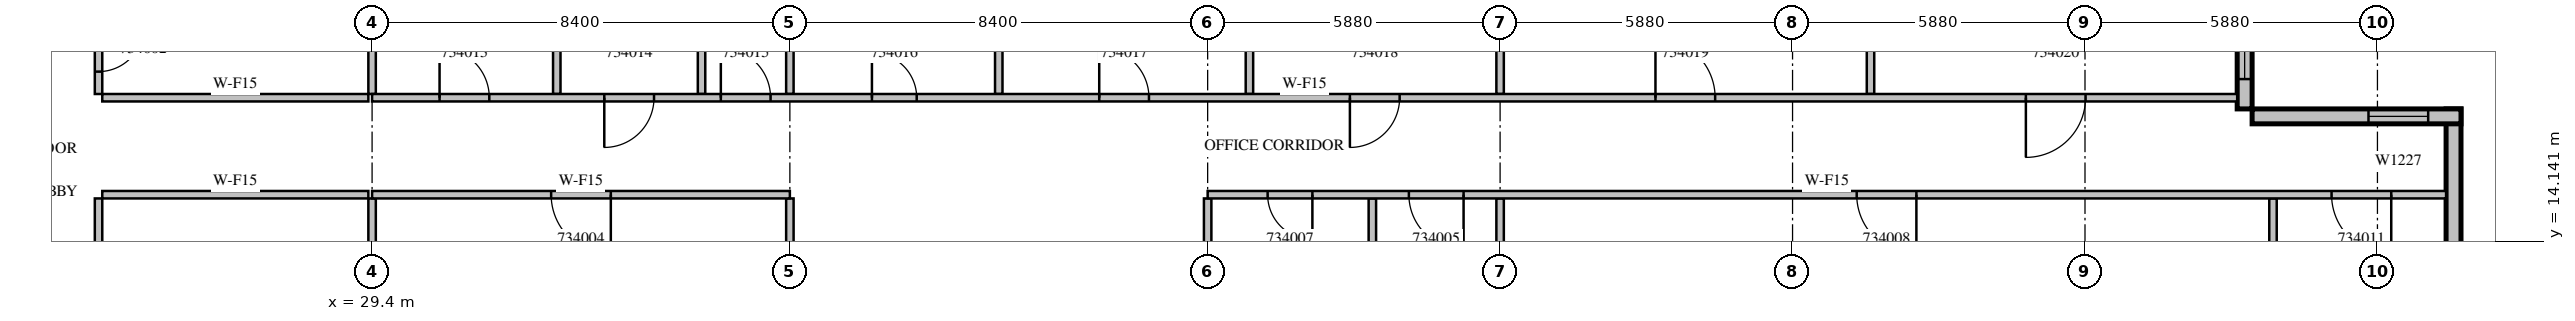
"""IFC4 building model, lengths in metres.
Left out: names, types, materials, properties, quantities, classifications, styles, units other than length and angle.
Written with IfcOpenShell. Run it as: python <this file> out.ifc"""

import sys

from ifc_helpers import new_model, si_unit, direction, frame, frame_2d, origin, place, context, subcontext, project, spatial, rectangle, extrude, source, transform, mapped, element, fill, save


model = new_model("IFC4")
c1 = context("Model", 3, precision=1e-05, world=origin(), true_north=direction((0.0, 1.0)))
c2 = subcontext(c1, "Body", "Model", "MODEL_VIEW")
j1 = project(units=[si_unit("LENGTHUNIT", "METRE"), si_unit("PLANEANGLEUNIT", "RADIAN")], contexts=[c1])
p1 = place(None, origin())
s1 = spatial("IfcSite", under=j1, at=p1, CompositionType="ELEMENT")
p2 = place(p1, origin())
s2 = spatial("IfcBuilding", under=s1, at=p2, CompositionType="ELEMENT")
p3 = place(p2, frame((0.0, 0.0, 153.9)))
s3 = spatial("IfcBuildingStorey", under=s2, at=p3, CompositionType="ELEMENT", Elevation=153.9)
m1 = source(origin(), c2, "Body", "SweptSolid", [
    extrude(rectangle(XDim=6.3, YDim=0.3, at=frame_2d((3.15, 0.0))), origin(), (0.0, 0.0, 1.0), 3.8),
])
p4 = place(p3, frame((71.25, 10.5, 0.0), z_axis=(0.0, 0.0, 1.0), x_axis=(0.0, 1.0, 0.0)))
e1 = element("IfcWall", 1, at=p4, inside=s3, PredefinedType="STANDARD", context=c2, shape_type="MappedRepresentation", body=[
    mapped(m1, transform((0.0, 0.0, 0.0), scale=1.0)),
])
m2 = source(origin(), c2, "Body", "SweptSolid", [
    extrude(rectangle(XDim=1.2, YDim=2.7, at=frame_2d((0.6, 1.35))), frame((0.0, 0.16, 0.0), z_axis=(0.0, -1.0, 0.0), x_axis=(1.0, 0.0, 0.0)), (0.0, 0.0, 1.0), 0.32),
])
p5 = place(p4, frame((1.025, 0.0, 0.6)))
e2 = element("IfcOpeningElement", 2, at=p5, cuts=e1, PredefinedType="OPENING", context=c2, shape_type="MappedRepresentation", body=[
    mapped(m2, transform((0.0, 0.0, 0.0), scale=1.0)),
])
m3 = source(origin(), c2, "Body", "SweptSolid", [
    extrude(rectangle(XDim=4.2, YDim=0.3, at=frame_2d((2.1, 0.0))), origin(), (0.0, 0.0, 1.0), 3.8),
])
p6 = place(p3, frame((71.4, 16.65, 0.0), z_axis=(0.0, 0.0, 1.0), x_axis=(-1.0, 0.0, 0.0)))
e3 = element("IfcWall", 3, at=p6, inside=s3, PredefinedType="STANDARD", context=c2, shape_type="MappedRepresentation", body=[
    mapped(m3, transform((0.0, 0.0, 0.0), scale=1.0)),
])
p7 = place(p6, frame((0.66, 0.0, 0.6)))
e4 = element("IfcOpeningElement", 4, at=p7, cuts=e3, PredefinedType="OPENING", context=c2, shape_type="MappedRepresentation", body=[
    mapped(m2, transform((0.0, 0.0, 0.0), scale=1.0)),
])
p8 = place(p3, frame((67.05, 16.8, 0.0), z_axis=(0.0, 0.0, 1.0), x_axis=(0.0, 1.0, 0.0)))
e5 = element("IfcWall", 5, at=p8, inside=s3, PredefinedType="STANDARD", context=c2, shape_type="MappedRepresentation", body=[
    mapped(m3, transform((0.0, 0.0, 0.0), scale=1.0)),
])
m4 = source(origin(), c2, "Body", "SweptSolid", [
    extrude(rectangle(XDim=3.0, YDim=2.7, at=frame_2d((1.5, 1.35))), frame((0.0, 0.16, 0.0), z_axis=(0.0, -1.0, 0.0), x_axis=(1.0, 0.0, 0.0)), (0.0, 0.0, 1.0), 0.32),
])
p9 = place(p8, frame((0.6, 0.0, 0.6)))
e6 = element("IfcOpeningElement", 6, at=p9, cuts=e5, PredefinedType="OPENING", context=c2, shape_type="MappedRepresentation", body=[
    mapped(m4, transform((0.0, 0.0, 0.0), scale=1.0)),
])
m5 = source(origin(), c2, "Body", "SweptSolid", [
    extrude(rectangle(XDim=4.295, YDim=0.15, at=frame_2d((2.147, 0.0))), origin(), (0.0, 0.0, 1.0), 3.8),
])
p10 = place(p3, frame((23.9, 15.0, 0.0), z_axis=(0.0, 0.0, 1.0), x_axis=(0.0, -1.0, 0.0)))
e7 = element("IfcWall", 7, at=p10, inside=s3, PredefinedType="PARTITIONING", context=c2, shape_type="MappedRepresentation", body=[
    mapped(m5, transform((0.0, 0.0, 0.0), scale=1.0)),
])
m6 = source(origin(), c2, "Body", "SweptSolid", [
    extrude(rectangle(XDim=0.9, YDim=2.1, at=frame_2d((0.45, 1.05))), frame((0.0, 0.085, 0.0), z_axis=(0.0, -1.0, 0.0), x_axis=(1.0, 0.0, 0.0)), (0.0, 0.0, 1.0), 0.17),
])
p11 = place(p10, frame((1.113, 0.0, 0.0)))
e8 = element("IfcOpeningElement", 8, at=p11, cuts=e7, PredefinedType="OPENING", context=c2, shape_type="MappedRepresentation", body=[
    mapped(m6, transform((0.0, 0.0, 0.0), scale=1.0)),
])
m7 = source(origin(), c2, "Body", "SweptSolid", [
    extrude(rectangle(XDim=3.6, YDim=0.15, at=frame_2d((1.8, 0.0))), origin(), (0.0, 0.0, 1.0), 3.8),
])
p12 = place(p3, frame((23.9, 20.7, 0.0), z_axis=(0.0, 0.0, 1.0), x_axis=(0.0, -1.0, 0.0)))
e9 = element("IfcWall", 9, at=p12, inside=s3, PredefinedType="PARTITIONING", context=c2, shape_type="MappedRepresentation", body=[
    mapped(m7, transform((0.0, 0.0, 0.0), scale=1.0)),
])
p13 = place(p12, frame((2.25, 0.0, 0.0)))
e10 = element("IfcOpeningElement", 10, at=p13, cuts=e9, PredefinedType="OPENING", context=c2, shape_type="MappedRepresentation", body=[
    mapped(m6, transform((0.0, 0.0, 0.0), scale=1.0)),
])
m8 = source(origin(), c2, "Body", "SweptSolid", [
    extrude(rectangle(XDim=5.35, YDim=0.15, at=frame_2d((2.675, 0.0))), origin(), (0.0, 0.0, 1.0), 3.8),
])
for number, where, z_axis, x_axis in (
    (11, (29.325, 15.075, 0.0), (0.0, 0.0, 1.0), (-1.0, 0.0, 0.0)),
    (12, (23.975, 17.025, 0.0), (0.0, 0.0, 1.0), (1.0, 0.0, 0.0)),
):
    element("IfcWall", number, at=place(p3, frame(where, z_axis=z_axis, x_axis=x_axis)), inside=s3, PredefinedType="PARTITIONING", context=c2, shape_type="MappedRepresentation", body=[
        mapped(m8, transform((0.0, 0.0, 0.0), scale=1.0)),
    ])
m9 = source(origin(), c2, "Body", "SweptSolid", [
    extrude(rectangle(XDim=3.976, YDim=0.15, at=frame_2d((1.988, 0.0))), origin(), (0.0, 0.0, 1.0), 3.8),
])
p14 = place(p3, frame((29.4, 11.024, 0.0), z_axis=(0.0, 0.0, 1.0), x_axis=(0.0, 1.0, 0.0)))
e13 = element("IfcWall", 13, at=p14, inside=s3, PredefinedType="PARTITIONING", context=c2, shape_type="MappedRepresentation", body=[
    mapped(m9, transform((0.0, 0.0, 0.0), scale=1.0)),
])
m10 = source(origin(), c2, "Body", "SweptSolid", [
    extrude(rectangle(XDim=2.851, YDim=0.15, at=frame_2d((1.425, 0.0))), origin(), (0.0, 0.0, 1.0), 3.8),
])
p15 = place(p3, frame((29.4, 17.1, 0.0), z_axis=(0.0, 0.0, 1.0), x_axis=(0.0, 1.0, 0.0)))
e14 = element("IfcWall", 14, at=p15, inside=s3, PredefinedType="PARTITIONING", context=c2, shape_type="MappedRepresentation", body=[
    mapped(m10, transform((0.0, 0.0, 0.0), scale=1.0)),
])
p16 = place(p3, frame((37.8, 11.024, 0.0), z_axis=(0.0, 0.0, 1.0), x_axis=(0.0, 1.0, 0.0)))
e15 = element("IfcWall", 15, at=p16, inside=s3, PredefinedType="PARTITIONING", context=c2, shape_type="MappedRepresentation", body=[
    mapped(m9, transform((0.0, 0.0, 0.0), scale=1.0)),
])
m11 = source(origin(), c2, "Body", "SweptSolid", [
    extrude(rectangle(XDim=3.825, YDim=0.15, at=frame_2d((1.913, 0.0))), origin(), (0.0, 0.0, 1.0), 3.8),
])
for number, where, z_axis, x_axis in (
    (16, (49.512, 11.175, 0.0), (0.0, 0.0, 1.0), (0.0, 1.0, 0.0)),
    (17, (46.2, 11.175, 0.0), (0.0, 0.0, 1.0), (0.0, 1.0, 0.0)),
    (18, (52.08, 11.175, 0.0), (0.0, 0.0, 1.0), (0.0, 1.0, 0.0)),
    (19, (67.62, 11.175, 0.0), (0.0, 0.0, 1.0), (0.0, 1.0, 0.0)),
):
    element("IfcWall", number, at=place(p3, frame(where, z_axis=z_axis, x_axis=x_axis)), inside=s3, PredefinedType="PARTITIONING", context=c2, shape_type="MappedRepresentation", body=[
        mapped(m11, transform((0.0, 0.0, 0.0), scale=1.0)),
    ])
for number, where, z_axis, x_axis in (
    (20, (33.113, 20.7, 0.0), (0.0, 0.0, 1.0), (0.0, -1.0, 0.0)),
    (21, (36.024, 20.7, 0.0), (0.0, 0.0, 1.0), (0.0, -1.0, 0.0)),
    (22, (47.04, 20.7, 0.0), (0.0, 0.0, 1.0), (0.0, -1.0, 0.0)),
    (23, (59.528, 20.7, 0.0), (0.0, 0.0, 1.0), (0.0, -1.0, 0.0)),
):
    element("IfcWall", number, at=place(p3, frame(where, z_axis=z_axis, x_axis=x_axis)), inside=s3, PredefinedType="PARTITIONING", context=c2, shape_type="MappedRepresentation", body=[
        mapped(m7, transform((0.0, 0.0, 0.0), scale=1.0)),
    ])
p17 = place(p3, frame((37.8, 17.1, 0.0), z_axis=(0.0, 0.0, 1.0), x_axis=(0.0, 1.0, 0.0)))
e24 = element("IfcWall", 24, at=p17, inside=s3, PredefinedType="PARTITIONING", context=c2, shape_type="MappedRepresentation", body=[
    mapped(m10, transform((0.0, 0.0, 0.0), scale=1.0)),
])
p18 = place(p3, frame((42.0, 17.1, 0.0), z_axis=(0.0, 0.0, 1.0), x_axis=(0.0, 1.0, 0.0)))
e25 = element("IfcWall", 25, at=p18, inside=s3, PredefinedType="PARTITIONING", context=c2, shape_type="MappedRepresentation", body=[
    mapped(m7, transform((0.0, 0.0, 0.0), scale=1.0)),
])
p19 = place(p3, frame((52.08, 17.1, 0.0), z_axis=(0.0, 0.0, 1.0), x_axis=(0.0, 1.0, 0.0)))
e26 = element("IfcWall", 26, at=p19, inside=s3, PredefinedType="PARTITIONING", context=c2, shape_type="MappedRepresentation", body=[
    mapped(m10, transform((0.0, 0.0, 0.0), scale=1.0)),
])
m12 = source(origin(), c2, "Body", "SweptSolid", [
    extrude(rectangle(XDim=8.4, YDim=0.15, at=frame_2d((4.2, 0.0))), origin(), (0.0, 0.0, 1.0), 3.8),
])
p20 = place(p3, frame((37.8, 15.075, 0.0), z_axis=(0.0, 0.0, 1.0), x_axis=(-1.0, 0.0, 0.0)))
e27 = element("IfcWall", 27, at=p20, inside=s3, PredefinedType="PARTITIONING", context=c2, shape_type="MappedRepresentation", body=[
    mapped(m12, transform((0.0, 0.0, 0.0), scale=1.0)),
])
m13 = source(origin(), c2, "Body", "SweptSolid", [
    extrude(rectangle(XDim=1.2, YDim=2.1, at=frame_2d((0.6, 1.05))), frame((0.0, 0.085, 0.0), z_axis=(0.0, -1.0, 0.0), x_axis=(1.0, 0.0, 0.0)), (0.0, 0.0, 1.0), 0.17),
])
p21 = place(p20, frame((3.6, 0.0, 0.0)))
e28 = element("IfcOpeningElement", 28, at=p21, cuts=e27, PredefinedType="OPENING", context=c2, shape_type="MappedRepresentation", body=[
    mapped(m13, transform((0.0, 0.0, 0.0), scale=1.0)),
])
m14 = source(origin(), c2, "Body", "SweptSolid", [
    extrude(rectangle(XDim=24.9, YDim=0.15, at=frame_2d((12.45, 0.0))), origin(), (0.0, 0.0, 1.0), 3.8),
])
p22 = place(p3, frame((71.1, 15.075, 0.0), z_axis=(0.0, 0.0, 1.0), x_axis=(-1.0, 0.0, 0.0)))
e29 = element("IfcWall", 29, at=p22, inside=s3, PredefinedType="PARTITIONING", context=c2, shape_type="MappedRepresentation", body=[
    mapped(m14, transform((0.0, 0.0, 0.0), scale=1.0)),
])
m15 = source(origin(), c2, "Body", "SweptSolid", [
    extrude(rectangle(XDim=1.1, YDim=2.1, at=frame_2d((0.55, 1.05))), frame((0.0, 0.085, 0.0), z_axis=(0.0, -1.0, 0.0), x_axis=(1.0, 0.0, 0.0)), (0.0, 0.0, 1.0), 0.17),
])
p23 = place(p22, frame((19.754, 0.0, 0.0)))
e30 = element("IfcOpeningElement", 30, at=p23, cuts=e29, PredefinedType="OPENING", context=c2, shape_type="MappedRepresentation", body=[
    mapped(m15, transform((0.0, 0.0, 0.0), scale=1.0)),
])
p24 = place(p22, frame((22.794, 0.0, 0.0)))
e31 = element("IfcOpeningElement", 31, at=p24, cuts=e29, PredefinedType="OPENING", context=c2, shape_type="MappedRepresentation", body=[
    mapped(m6, transform((0.0, 0.0, 0.0), scale=1.0)),
])
p25 = place(p22, frame((10.65, 0.0, 0.0)))
e32 = element("IfcOpeningElement", 32, at=p25, cuts=e29, PredefinedType="OPENING", context=c2, shape_type="MappedRepresentation", body=[
    mapped(m13, transform((0.0, 0.0, 0.0), scale=1.0)),
])
p26 = place(p22, frame((1.103, 0.0, 0.0)))
e33 = element("IfcOpeningElement", 33, at=p26, cuts=e29, PredefinedType="OPENING", context=c2, shape_type="MappedRepresentation", body=[
    mapped(m13, transform((0.0, 0.0, 0.0), scale=1.0)),
])
m16 = source(origin(), c2, "Body", "SweptSolid", [
    extrude(rectangle(XDim=37.5, YDim=0.15, at=frame_2d((18.75, 0.0))), origin(), (0.0, 0.0, 1.0), 3.8),
])
p27 = place(p3, frame((29.4, 17.025, 0.0), z_axis=(0.0, 0.0, 1.0), x_axis=(1.0, 0.0, 0.0)))
e34 = element("IfcWall", 34, at=p27, inside=s3, PredefinedType="PARTITIONING", context=c2, shape_type="MappedRepresentation", body=[
    mapped(m16, transform((0.0, 0.0, 0.0), scale=1.0)),
])
m17 = source(origin(), c2, "Body", "SweptSolid", [
    extrude(rectangle(XDim=1.0, YDim=2.1, at=frame_2d((0.5, 1.05))), frame((0.0, 0.085, 0.0), z_axis=(0.0, -1.0, 0.0), x_axis=(1.0, 0.0, 0.0)), (0.0, 0.0, 1.0), 0.17),
])
p28 = place(p27, frame((1.357, 0.0, 0.0)))
e35 = element("IfcOpeningElement", 35, at=p28, cuts=e34, PredefinedType="OPENING", context=c2, shape_type="MappedRepresentation", body=[
    mapped(m17, transform((0.0, 0.0, 0.0), scale=1.0)),
])
p29 = place(p27, frame((4.669, 0.0, 0.0)))
e36 = element("IfcOpeningElement", 36, at=p29, cuts=e34, PredefinedType="OPENING", context=c2, shape_type="MappedRepresentation", body=[
    mapped(m17, transform((0.0, 0.0, 0.0), scale=1.0)),
])
p30 = place(p27, frame((7.012, 0.0, 0.0)))
e37 = element("IfcOpeningElement", 37, at=p30, cuts=e34, PredefinedType="OPENING", context=c2, shape_type="MappedRepresentation", body=[
    mapped(m17, transform((0.0, 0.0, 0.0), scale=1.0)),
])
p31 = place(p27, frame((10.05, 0.0, 0.0)))
e38 = element("IfcOpeningElement", 38, at=p31, cuts=e34, PredefinedType="OPENING", context=c2, shape_type="MappedRepresentation", body=[
    mapped(m6, transform((0.0, 0.0, 0.0), scale=1.0)),
])
p32 = place(p27, frame((14.62, 0.0, 0.0)))
e39 = element("IfcOpeningElement", 39, at=p32, cuts=e34, PredefinedType="OPENING", context=c2, shape_type="MappedRepresentation", body=[
    mapped(m17, transform((0.0, 0.0, 0.0), scale=1.0)),
])
p33 = place(p27, frame((19.66, 0.0, 0.0)))
e40 = element("IfcOpeningElement", 40, at=p33, cuts=e34, PredefinedType="OPENING", context=c2, shape_type="MappedRepresentation", body=[
    mapped(m17, transform((0.0, 0.0, 0.0), scale=1.0)),
])
p34 = place(p27, frame((25.804, 0.0, 0.0)))
e41 = element("IfcOpeningElement", 41, at=p34, cuts=e34, PredefinedType="OPENING", context=c2, shape_type="MappedRepresentation", body=[
    mapped(m13, transform((0.0, 0.0, 0.0), scale=1.0)),
])
p35 = place(p27, frame((33.251, 0.0, 0.0)))
e42 = element("IfcOpeningElement", 42, at=p35, cuts=e34, PredefinedType="OPENING", context=c2, shape_type="MappedRepresentation", body=[
    mapped(m13, transform((0.0, 0.0, 0.0), scale=1.0)),
])
m18 = source(origin(), c2, "Body", "SweptSolid", [
    extrude(rectangle(XDim=1.2, YDim=2.7, at=frame_2d((0.6, 1.35))), frame((0.0, 0.03, 0.0), z_axis=(0.0, -1.0, 0.0), x_axis=(1.0, 0.0, 0.0)), (0.0, 0.0, 1.0), 0.06),
])
p36 = place(p7, origin())
e43 = element("IfcWindow", 43, at=p36, inside=s3, PartitioningType="SINGLE_PANEL", PredefinedType="WINDOW", context=c2, shape_type="MappedRepresentation", body=[
    mapped(m18, transform((0.0, 0.0, 0.0), scale=1.0)),
])
fill(e4, e43)
m19 = source(origin(), c2, "Body", "SweptSolid", [
    extrude(rectangle(XDim=3.0, YDim=2.7, at=frame_2d((1.5, 1.35))), frame((0.0, 0.03, 0.0), z_axis=(0.0, -1.0, 0.0), x_axis=(1.0, 0.0, 0.0)), (0.0, 0.0, 1.0), 0.06),
])
p37 = place(p9, origin())
e44 = element("IfcWindow", 44, at=p37, inside=s3, PartitioningType="SINGLE_PANEL", PredefinedType="WINDOW", context=c2, shape_type="MappedRepresentation", body=[
    mapped(m19, transform((0.0, 0.0, 0.0), scale=1.0)),
])
fill(e6, e44)
m20 = source(origin(), c2, "Body", "SweptSolid", [
    extrude(rectangle(XDim=0.9, YDim=2.1, at=frame_2d((0.45, 1.05))), frame((0.0, 0.025, 0.0), z_axis=(0.0, -1.0, 0.0), x_axis=(1.0, 0.0, 0.0)), (0.0, 0.0, 1.0), 0.05),
])
p38 = place(p13, origin())
e45 = element("IfcDoor", 45, at=p38, inside=s3, OperationType="SINGLE_SWING_LEFT", PredefinedType="DOOR", context=c2, shape_type="MappedRepresentation", body=[
    mapped(m20, transform((0.0, 0.0, 0.0), scale=1.0)),
])
fill(e10, e45)
m21 = source(origin(), c2, "Body", "SweptSolid", [
    extrude(rectangle(XDim=1.2, YDim=2.1, at=frame_2d((0.6, 1.05))), frame((0.0, 0.025, 0.0), z_axis=(0.0, -1.0, 0.0), x_axis=(1.0, 0.0, 0.0)), (0.0, 0.0, 1.0), 0.05),
])
p39 = place(p21, origin())
e46 = element("IfcDoor", 46, at=p39, inside=s3, OperationType="SINGLE_SWING_LEFT", PredefinedType="DOOR", context=c2, shape_type="MappedRepresentation", body=[
    mapped(m21, transform((0.0, 0.0, 0.0), scale=1.0)),
])
fill(e28, e46)
m22 = source(origin(), c2, "Body", "SweptSolid", [
    extrude(rectangle(XDim=1.1, YDim=2.1, at=frame_2d((0.55, 1.05))), frame((0.0, 0.025, 0.0), z_axis=(0.0, -1.0, 0.0), x_axis=(1.0, 0.0, 0.0)), (0.0, 0.0, 1.0), 0.05),
])
p40 = place(p23, origin())
e47 = element("IfcDoor", 47, at=p40, inside=s3, OperationType="SINGLE_SWING_LEFT", PredefinedType="DOOR", context=c2, shape_type="MappedRepresentation", body=[
    mapped(m22, transform((0.0, 0.0, 0.0), scale=1.0)),
])
fill(e30, e47)
p41 = place(p24, origin())
e48 = element("IfcDoor", 48, at=p41, inside=s3, OperationType="SINGLE_SWING_LEFT", PredefinedType="DOOR", context=c2, shape_type="MappedRepresentation", body=[
    mapped(m20, transform((0.0, 0.0, 0.0), scale=1.0)),
])
fill(e31, e48)
p42 = place(p25, origin())
e49 = element("IfcDoor", 49, at=p42, inside=s3, OperationType="SINGLE_SWING_LEFT", PredefinedType="DOOR", context=c2, shape_type="MappedRepresentation", body=[
    mapped(m21, transform((0.0, 0.0, 0.0), scale=1.0)),
])
fill(e32, e49)
p43 = place(p26, origin())
e50 = element("IfcDoor", 50, at=p43, inside=s3, OperationType="SINGLE_SWING_LEFT", PredefinedType="DOOR", context=c2, shape_type="MappedRepresentation", body=[
    mapped(m21, transform((0.0, 0.0, 0.0), scale=1.0)),
])
fill(e33, e50)
m23 = source(origin(), c2, "Body", "SweptSolid", [
    extrude(rectangle(XDim=1.0, YDim=2.1, at=frame_2d((0.5, 1.05))), frame((0.0, 0.025, 0.0), z_axis=(0.0, -1.0, 0.0), x_axis=(1.0, 0.0, 0.0)), (0.0, 0.0, 1.0), 0.05),
])
p44 = place(p28, origin())
e51 = element("IfcDoor", 51, at=p44, inside=s3, OperationType="SINGLE_SWING_LEFT", PredefinedType="DOOR", context=c2, shape_type="MappedRepresentation", body=[
    mapped(m23, transform((0.0, 0.0, 0.0), scale=1.0)),
])
fill(e35, e51)
p45 = place(p29, origin())
e52 = element("IfcDoor", 52, at=p45, inside=s3, OperationType="SINGLE_SWING_RIGHT", PredefinedType="DOOR", context=c2, shape_type="MappedRepresentation", body=[
    mapped(m23, transform((0.0, 0.0, 0.0), scale=1.0)),
])
fill(e36, e52)
p46 = place(p30, origin())
e53 = element("IfcDoor", 53, at=p46, inside=s3, OperationType="SINGLE_SWING_LEFT", PredefinedType="DOOR", context=c2, shape_type="MappedRepresentation", body=[
    mapped(m23, transform((0.0, 0.0, 0.0), scale=1.0)),
])
fill(e37, e53)
p47 = place(p31, origin())
e54 = element("IfcDoor", 54, at=p47, inside=s3, OperationType="SINGLE_SWING_LEFT", PredefinedType="DOOR", context=c2, shape_type="MappedRepresentation", body=[
    mapped(m20, transform((0.0, 0.0, 0.0), scale=1.0)),
])
fill(e38, e54)
p48 = place(p32, origin())
e55 = element("IfcDoor", 55, at=p48, inside=s3, OperationType="SINGLE_SWING_LEFT", PredefinedType="DOOR", context=c2, shape_type="MappedRepresentation", body=[
    mapped(m23, transform((0.0, 0.0, 0.0), scale=1.0)),
])
fill(e39, e55)
p49 = place(p33, origin())
e56 = element("IfcDoor", 56, at=p49, inside=s3, OperationType="SINGLE_SWING_RIGHT", PredefinedType="DOOR", context=c2, shape_type="MappedRepresentation", body=[
    mapped(m23, transform((0.0, 0.0, 0.0), scale=1.0)),
])
fill(e40, e56)
p50 = place(p34, origin())
e57 = element("IfcDoor", 57, at=p50, inside=s3, OperationType="SINGLE_SWING_LEFT", PredefinedType="DOOR", context=c2, shape_type="MappedRepresentation", body=[
    mapped(m21, transform((0.0, 0.0, 0.0), scale=1.0)),
])
fill(e41, e57)
p51 = place(p35, origin())
e58 = element("IfcDoor", 58, at=p51, inside=s3, OperationType="SINGLE_SWING_RIGHT", PredefinedType="DOOR", context=c2, shape_type="MappedRepresentation", body=[
    mapped(m21, transform((0.0, 0.0, 0.0), scale=1.0)),
])
fill(e42, e58)
save(model, sys.argv[1])
